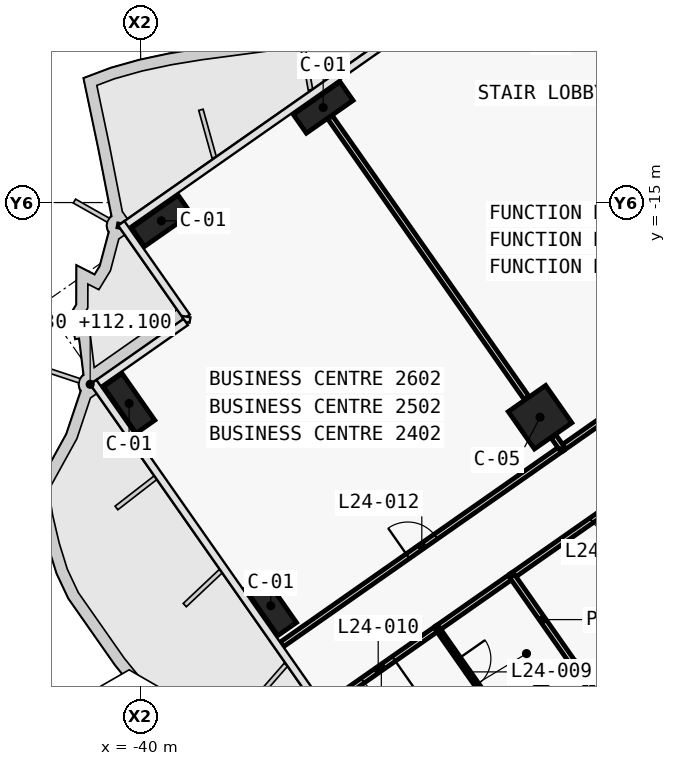
"""IFC4 building model, lengths in metres.
Left out: names, types, materials, properties, quantities, classifications, styles, units other than length and angle.
Written with IfcOpenShell. Run it as: python <this file> out.ifc"""

import sys

from ifc_helpers import new_model, si_unit, direction, frame, frame_2d, origin, origin_2d, place, context, subcontext, project, spatial, rectangle, extrude, element, fill, save


model = new_model("IFC4")
c1 = context("Model", 3, precision=1e-05, world=origin(), true_north=direction((0.0, 1.0)))
c2 = subcontext(c1, "Body", "Model", "MODEL_VIEW")
j1 = project(units=[si_unit("LENGTHUNIT", "METRE"), si_unit("PLANEANGLEUNIT", "RADIAN")], contexts=[c1])
p1 = place(None, origin())
s1 = spatial("IfcSite", under=j1, at=p1, CompositionType="ELEMENT")
p2 = place(p1, origin())
s2 = spatial("IfcBuilding", under=s1, at=p2, CompositionType="ELEMENT")
p3 = place(p2, frame((0.0, 0.0, 112.1)))
s3 = spatial("IfcBuildingStorey", under=s2, at=p3, CompositionType="ELEMENT", Elevation=112.1)
for number, where, z_axis, x_axis in (
    (1, (-35.197, -12.498, 0.0), (0.0, 0.0, 1.0), (-0.819, -0.574, 0.0)),
    (2, (-39.456, -15.481, 0.0), (0.0, 0.0, 1.0), (-0.819, -0.574, 0.0)),
    (3, (-36.575, -25.61, 0.0), (0.0, 0.0, 1.0), (-0.574, 0.819, 0.0)),
    (4, (-40.303, -20.286, 0.0), (0.0, 0.0, 1.0), (-0.574, 0.819, 0.0)),
):
    element("IfcColumn", number, at=place(p3, frame(where, z_axis=z_axis, x_axis=x_axis)), inside=s3, PredefinedType="COLUMN", context=c2, shape_type="SweptSolid", body=[
        extrude(rectangle(XDim=1.5, YDim=0.6, at=origin_2d()), origin(), (0.0, 0.0, 1.0), 3.6),
    ])
p4 = place(p3, frame((-29.49, -20.649, 0.0), z_axis=(0.0, 0.0, 1.0), x_axis=(-0.819152044289, -0.573576436351, 0.0)))
e5 = element("IfcColumn", 5, at=p4, inside=s3, PredefinedType="COLUMN", context=c2, shape_type="SweptSolid", body=[
    extrude(rectangle(XDim=1.2, YDim=1.2, at=origin_2d()), origin(), (0.0, 0.0, 1.0), 3.6),
])
p5 = place(p3, frame((-28.917, -21.469, 0.0), z_axis=(0.0, 0.0, 1.0), x_axis=(0.819152599934, 0.573575642807, 0.0)))
e6 = element("IfcWall", 6, at=p5, inside=s3, PredefinedType="PARTITIONING", context=c2, shape_type="SweptSolid", body=[
    extrude(rectangle(XDim=8.098, YDim=0.15, at=frame_2d((4.049, 0.0))), origin(), (0.0, 0.0, 1.0), 2.6),
])
p6 = place(p5, frame((3.599, 0.0, 0.0)))
e7 = element("IfcOpeningElement", 7, at=p6, cuts=e6, PredefinedType="OPENING", context=c2, shape_type="SweptSolid", body=[
    extrude(rectangle(XDim=0.9, YDim=2.1, at=frame_2d((0.45, 1.05))), frame((0.0, 0.085, 0.0), z_axis=(0.0, -1.0, 0.0), x_axis=(1.0, 0.0, 0.0)), (0.0, 0.0, 1.0), 0.17),
])
p7 = place(p3, frame((-36.288, -26.63, 0.0), z_axis=(0.0, 0.0, 1.0), x_axis=(0.81915291695, 0.57357519006, 0.0)))
e8 = element("IfcWall", 8, at=p7, inside=s3, PredefinedType="PARTITIONING", context=c2, shape_type="SweptSolid", body=[
    extrude(rectangle(XDim=9.002, YDim=0.15, at=frame_2d((4.501, 0.0))), origin(), (0.0, 0.0, 1.0), 2.5),
])
p8 = place(p7, frame((4.051, 0.0, 0.0)))
e9 = element("IfcOpeningElement", 9, at=p8, cuts=e8, PredefinedType="OPENING", context=c2, shape_type="SweptSolid", body=[
    extrude(rectangle(XDim=0.9, YDim=2.1, at=frame_2d((0.45, 1.05))), frame((0.0, 0.085, 0.0), z_axis=(0.0, -1.0, 0.0), x_axis=(1.0, 0.0, 0.0)), (0.0, 0.0, 1.0), 0.17),
])
p9 = place(p3, frame((-25.31, -21.384, 0.0), z_axis=(0.0, 0.0, 1.0), x_axis=(-0.819145946981, -0.573585144111, 0.0)))
e10 = element("IfcWall", 10, at=p9, inside=s3, PredefinedType="PARTITIONING", context=c2, shape_type="SweptSolid", body=[
    extrude(rectangle(XDim=6.004, YDim=0.15, at=frame_2d((3.002, 0.0))), origin(), (0.0, 0.0, 1.0), 2.6),
])
p10 = place(p9, frame((2.552, 0.0, 0.0)))
e11 = element("IfcOpeningElement", 11, at=p10, cuts=e10, PredefinedType="OPENING", context=c2, shape_type="SweptSolid", body=[
    extrude(rectangle(XDim=0.9, YDim=2.1, at=frame_2d((0.45, 1.05))), frame((0.0, 0.085, 0.0), z_axis=(0.0, -1.0, 0.0), x_axis=(1.0, 0.0, 0.0)), (0.0, 0.0, 1.0), 0.17),
])
p11 = place(p3, frame((-32.191, -26.203, 0.0), z_axis=(0.0, 0.0, 1.0), x_axis=(-0.819149096931, -0.573580645591, 0.0)))
e12 = element("IfcWall", 12, at=p11, inside=s3, PredefinedType="PARTITIONING", context=c2, shape_type="SweptSolid", body=[
    extrude(rectangle(XDim=3.601, YDim=0.15, at=frame_2d((1.8, 0.0))), origin(), (0.0, 0.0, 1.0), 2.5),
])
p12 = place(p11, frame((1.401, 0.0, 0.0)))
e13 = element("IfcOpeningElement", 13, at=p12, cuts=e12, PredefinedType="OPENING", context=c2, shape_type="SweptSolid", body=[
    extrude(rectangle(XDim=1.0, YDim=2.1, at=frame_2d((0.5, 1.05))), frame((0.0, 0.085, 0.0), z_axis=(0.0, -1.0, 0.0), x_axis=(1.0, 0.0, 0.0)), (0.0, 0.0, 1.0), 0.17),
])
p13 = place(p3, frame((-30.225, -24.826, 0.0), z_axis=(0.0, 0.0, 1.0), x_axis=(-0.819146032251, -0.573585022335, 0.0)))
e14 = element("IfcWall", 14, at=p13, inside=s3, PredefinedType="PARTITIONING", context=c2, shape_type="SweptSolid", body=[
    extrude(rectangle(XDim=2.404, YDim=0.15, at=frame_2d((1.202, 0.0))), origin(), (0.0, 0.0, 1.0), 3.32),
])
p14 = place(p3, frame((-26.746, -12.014, 0.0), z_axis=(0.0, 0.0, 1.0), x_axis=(-0.573560650686, 0.819163097304, 0.0)))
e15 = element("IfcWall", 15, at=p14, inside=s3, PredefinedType="PARTITIONING", context=c2, shape_type="SweptSolid", body=[
    extrude(rectangle(XDim=3.0, YDim=0.15, at=frame_2d((1.5, 0.0))), origin(), (0.0, 0.0, 1.0), 3.32),
])
p15 = place(p3, frame((-28.916, -21.468, 0.0), z_axis=(0.0, 0.0, 1.0), x_axis=(-0.572944929411, 0.819593867633, 0.0)))
e16 = element("IfcWall", 16, at=p15, inside=s3, PredefinedType="PARTITIONING", context=c2, shape_type="SweptSolid", body=[
    extrude(rectangle(XDim=0.38, YDim=0.15, at=frame_2d((0.19, 0.0))), origin(), (0.0, 0.0, 1.0), 2.6),
])
p16 = place(p3, frame((-29.845, -20.141, 0.0), z_axis=(0.0, 0.0, 1.0), x_axis=(-0.573558725113, 0.819164445546, 0.0)))
e17 = element("IfcWall", 17, at=p16, inside=s3, PredefinedType="PARTITIONING", context=c2, shape_type="SweptSolid", body=[
    extrude(rectangle(XDim=9.01, YDim=0.15, at=frame_2d((4.505, 0.0))), origin(), (0.0, 0.0, 1.0), 2.6),
])
p17 = place(p3, frame((-26.039, -30.807, 0.0), z_axis=(0.0, 0.0, 1.0), x_axis=(-0.573593387921, 0.81914017441, 0.0)))
e18 = element("IfcWall", 18, at=p17, inside=s3, PredefinedType="PARTITIONING", context=c2, shape_type="SweptSolid", body=[
    extrude(rectangle(XDim=4.501, YDim=0.15, at=frame_2d((2.25, 0.0))), origin(), (0.0, 0.0, 1.0), 2.5),
])
p18 = place(p3, frame((-28.619, -27.122, 0.0), z_axis=(0.0, 0.0, 1.0), x_axis=(-0.573614360281, 0.819125488359, 0.0)))
e19 = element("IfcWall", 19, at=p18, inside=s3, PredefinedType="PARTITIONING", context=c2, shape_type="SweptSolid", body=[
    extrude(rectangle(XDim=2.802, YDim=0.15, at=frame_2d((1.401, 0.0))), origin(), (0.0, 0.0, 1.0), 3.32),
])
p19 = place(p3, frame((-32.193, -26.204, 0.0), z_axis=(0.0, 0.0, 1.0), x_axis=(0.573608623498, -0.819129505664, 0.0)))
e20 = element("IfcWall", 20, at=p19, inside=s3, PredefinedType="PARTITIONING", context=c2, shape_type="SweptSolid", body=[
    extrude(rectangle(XDim=2.8, YDim=0.12, at=frame_2d((1.4, 0.0))), origin(), (0.0, 0.0, 1.0), 3.32),
])
p20 = place(p19, frame((0.975, 0.0, 0.0)))
e21 = element("IfcOpeningElement", 21, at=p20, cuts=e20, PredefinedType="OPENING", context=c2, shape_type="SweptSolid", body=[
    extrude(rectangle(XDim=0.85, YDim=2.05, at=frame_2d((0.425, 1.025))), frame((0.0, 0.07, 0.0), z_axis=(0.0, -1.0, 0.0), x_axis=(1.0, 0.0, 0.0)), (0.0, 0.0, 1.0), 0.14),
])
p21 = place(p3, frame((-30.586, -28.498, 0.0), z_axis=(0.0, 0.0, 1.0), x_axis=(0.819141114317, 0.573592045652, 0.0)))
e22 = element("IfcWall", 22, at=p21, inside=s3, PredefinedType="PARTITIONING", context=c2, shape_type="SweptSolid", body=[
    extrude(rectangle(XDim=2.4, YDim=0.12, at=frame_2d((1.2, 0.0))), origin(), (0.0, 0.0, 1.0), 3.32),
])
p22 = place(p10, origin())
e23 = element("IfcDoor", 23, at=p22, inside=s3, OperationType="SINGLE_SWING_RIGHT", PredefinedType="DOOR", context=c2, shape_type="SweptSolid", body=[
    extrude(rectangle(XDim=0.9, YDim=2.1, at=frame_2d((0.45, 1.05))), frame((0.0, 0.025, 0.0), z_axis=(0.0, -1.0, 0.0), x_axis=(1.0, 0.0, 0.0)), (0.0, 0.0, 1.0), 0.05),
])
fill(e11, e23)
p23 = place(p20, origin())
e24 = element("IfcDoor", 24, at=p23, inside=s3, OperationType="SINGLE_SWING_LEFT", PredefinedType="DOOR", context=c2, shape_type="SweptSolid", body=[
    extrude(rectangle(XDim=0.85, YDim=2.05, at=frame_2d((0.425, 1.025))), frame((0.0, 0.025, 0.0), z_axis=(0.0, -1.0, 0.0), x_axis=(1.0, 0.0, 0.0)), (0.0, 0.0, 1.0), 0.05),
])
fill(e21, e24)
p24 = place(p12, origin())
e25 = element("IfcDoor", 25, at=p24, inside=s3, OperationType="SINGLE_SWING_LEFT", PredefinedType="DOOR", context=c2, shape_type="SweptSolid", body=[
    extrude(rectangle(XDim=1.0, YDim=2.1, at=frame_2d((0.5, 1.05))), frame((0.0, 0.025, 0.0), z_axis=(0.0, -1.0, 0.0), x_axis=(1.0, 0.0, 0.0)), (0.0, 0.0, 1.0), 0.05),
])
fill(e13, e25)
p25 = place(p8, origin())
e26 = element("IfcDoor", 26, at=p25, inside=s3, OperationType="SINGLE_SWING_LEFT", PredefinedType="DOOR", context=c2, shape_type="SweptSolid", body=[
    extrude(rectangle(XDim=0.9, YDim=2.1, at=frame_2d((0.45, 1.05))), frame((0.0, 0.025, 0.0), z_axis=(0.0, -1.0, 0.0), x_axis=(1.0, 0.0, 0.0)), (0.0, 0.0, 1.0), 0.05),
])
fill(e9, e26)
save(model, sys.argv[1])
